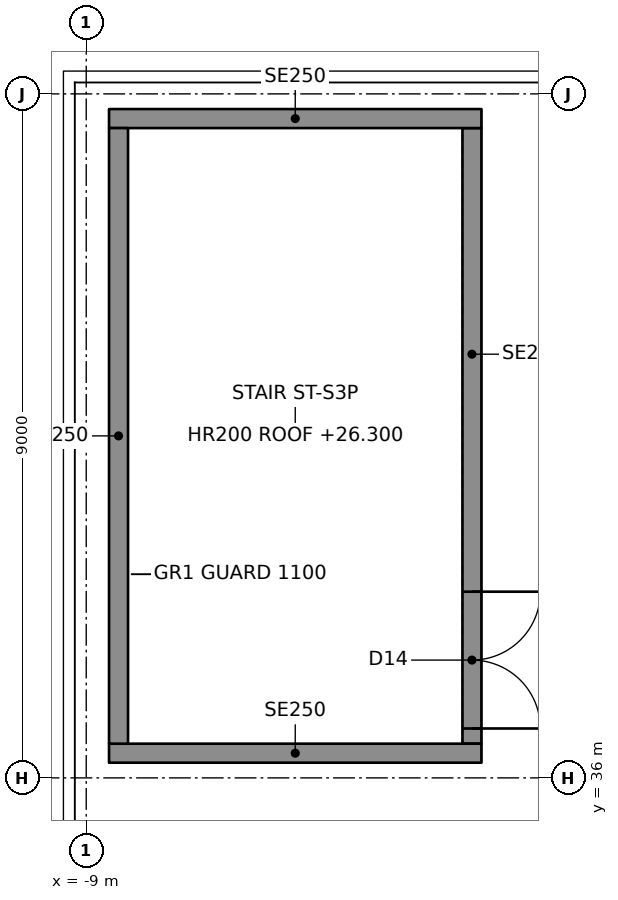
"""IFC4 building model, lengths in metres.
Left out: names, types, materials, properties, quantities, classifications, styles, units other than length and angle.
Written with IfcOpenShell. Run it as: python <this file> out.ifc"""

import sys

from ifc_helpers import new_model, si_unit, direction, frame, frame_2d, origin, place, context, subcontext, project, spatial, rectangle, extrude, element, fill, save


model = new_model("IFC4")
c1 = context("Model", 3, precision=1e-05, world=origin(), true_north=direction((0.0, 1.0)))
c2 = subcontext(c1, "Body", "Model", "MODEL_VIEW")
j1 = project(units=[si_unit("LENGTHUNIT", "METRE"), si_unit("PLANEANGLEUNIT", "RADIAN")], contexts=[c1])
p1 = place(None, origin())
s1 = spatial("IfcSite", under=j1, at=p1, CompositionType="ELEMENT")
p2 = place(p1, origin())
s2 = spatial("IfcBuilding", under=s1, at=p2, CompositionType="ELEMENT")
p3 = place(p2, frame((0.0, 0.0, 23.0)))
s3 = spatial("IfcBuildingStorey", under=s2, at=p3, CompositionType="ELEMENT", Elevation=23.0)
for number, where, z_axis, x_axis in (
    (1, (-8.7, 36.325, 0.0), (0.0, 0.0, 1.0), (1.0, 0.0, 0.0)),
    (2, (-8.7, 44.675, 0.0), (0.0, 0.0, 1.0), (1.0, 0.0, 0.0)),
):
    element("IfcWall", number, at=place(p3, frame(where, z_axis=z_axis, x_axis=x_axis)), inside=s3, PredefinedType="SOLIDWALL", context=c2, shape_type="SweptSolid", body=[
        extrude(rectangle(XDim=4.9, YDim=0.25, at=frame_2d((2.45, 0.0))), origin(), (0.0, 0.0, 1.0), 3.1),
    ])
p4 = place(p3, frame((-8.575, 36.45, 0.0), z_axis=(0.0, 0.0, 1.0), x_axis=(0.0, 1.0, 0.0)))
e3 = element("IfcWall", 3, at=p4, inside=s3, PredefinedType="SOLIDWALL", context=c2, shape_type="SweptSolid", body=[
    extrude(rectangle(XDim=8.1, YDim=0.25, at=frame_2d((4.05, 0.0))), origin(), (0.0, 0.0, 1.0), 3.1),
])
p5 = place(p3, frame((-3.925, 36.45, 0.0), z_axis=(0.0, 0.0, 1.0), x_axis=(0.0, 1.0, 0.0)))
e4 = element("IfcWall", 4, at=p5, inside=s3, PredefinedType="SOLIDWALL", context=c2, shape_type="SweptSolid", body=[
    extrude(rectangle(XDim=8.1, YDim=0.25, at=frame_2d((4.05, 0.0))), origin(), (0.0, 0.0, 1.0), 3.1),
])
p6 = place(p5, frame((0.2, 0.0, 0.0)))
e5 = element("IfcOpeningElement", 5, at=p6, cuts=e4, PredefinedType="OPENING", context=c2, shape_type="SweptSolid", body=[
    extrude(rectangle(XDim=1.8, YDim=2.1, at=frame_2d((0.9, 1.05))), frame((0.0, 0.135, 0.0), z_axis=(0.0, -1.0, 0.0), x_axis=(1.0, 0.0, 0.0)), (0.0, 0.0, 1.0), 0.27),
])
p7 = place(p6, frame((1.8, 0.0, 0.0), z_axis=(0.0, 0.0, 1.0), x_axis=(-1.0, 0.0, 0.0)))
e6 = element("IfcDoor", 6, at=p7, inside=s3, OperationType="DOUBLE_DOOR_SINGLE_SWING", PredefinedType="DOOR", context=c2, shape_type="SweptSolid", body=[
    extrude(rectangle(XDim=1.8, YDim=2.1, at=frame_2d((0.9, 1.05))), frame((0.0, 0.025, 0.0), z_axis=(0.0, -1.0, 0.0), x_axis=(1.0, 0.0, 0.0)), (0.0, 0.0, 1.0), 0.05),
])
fill(e5, e6)
save(model, sys.argv[1])
